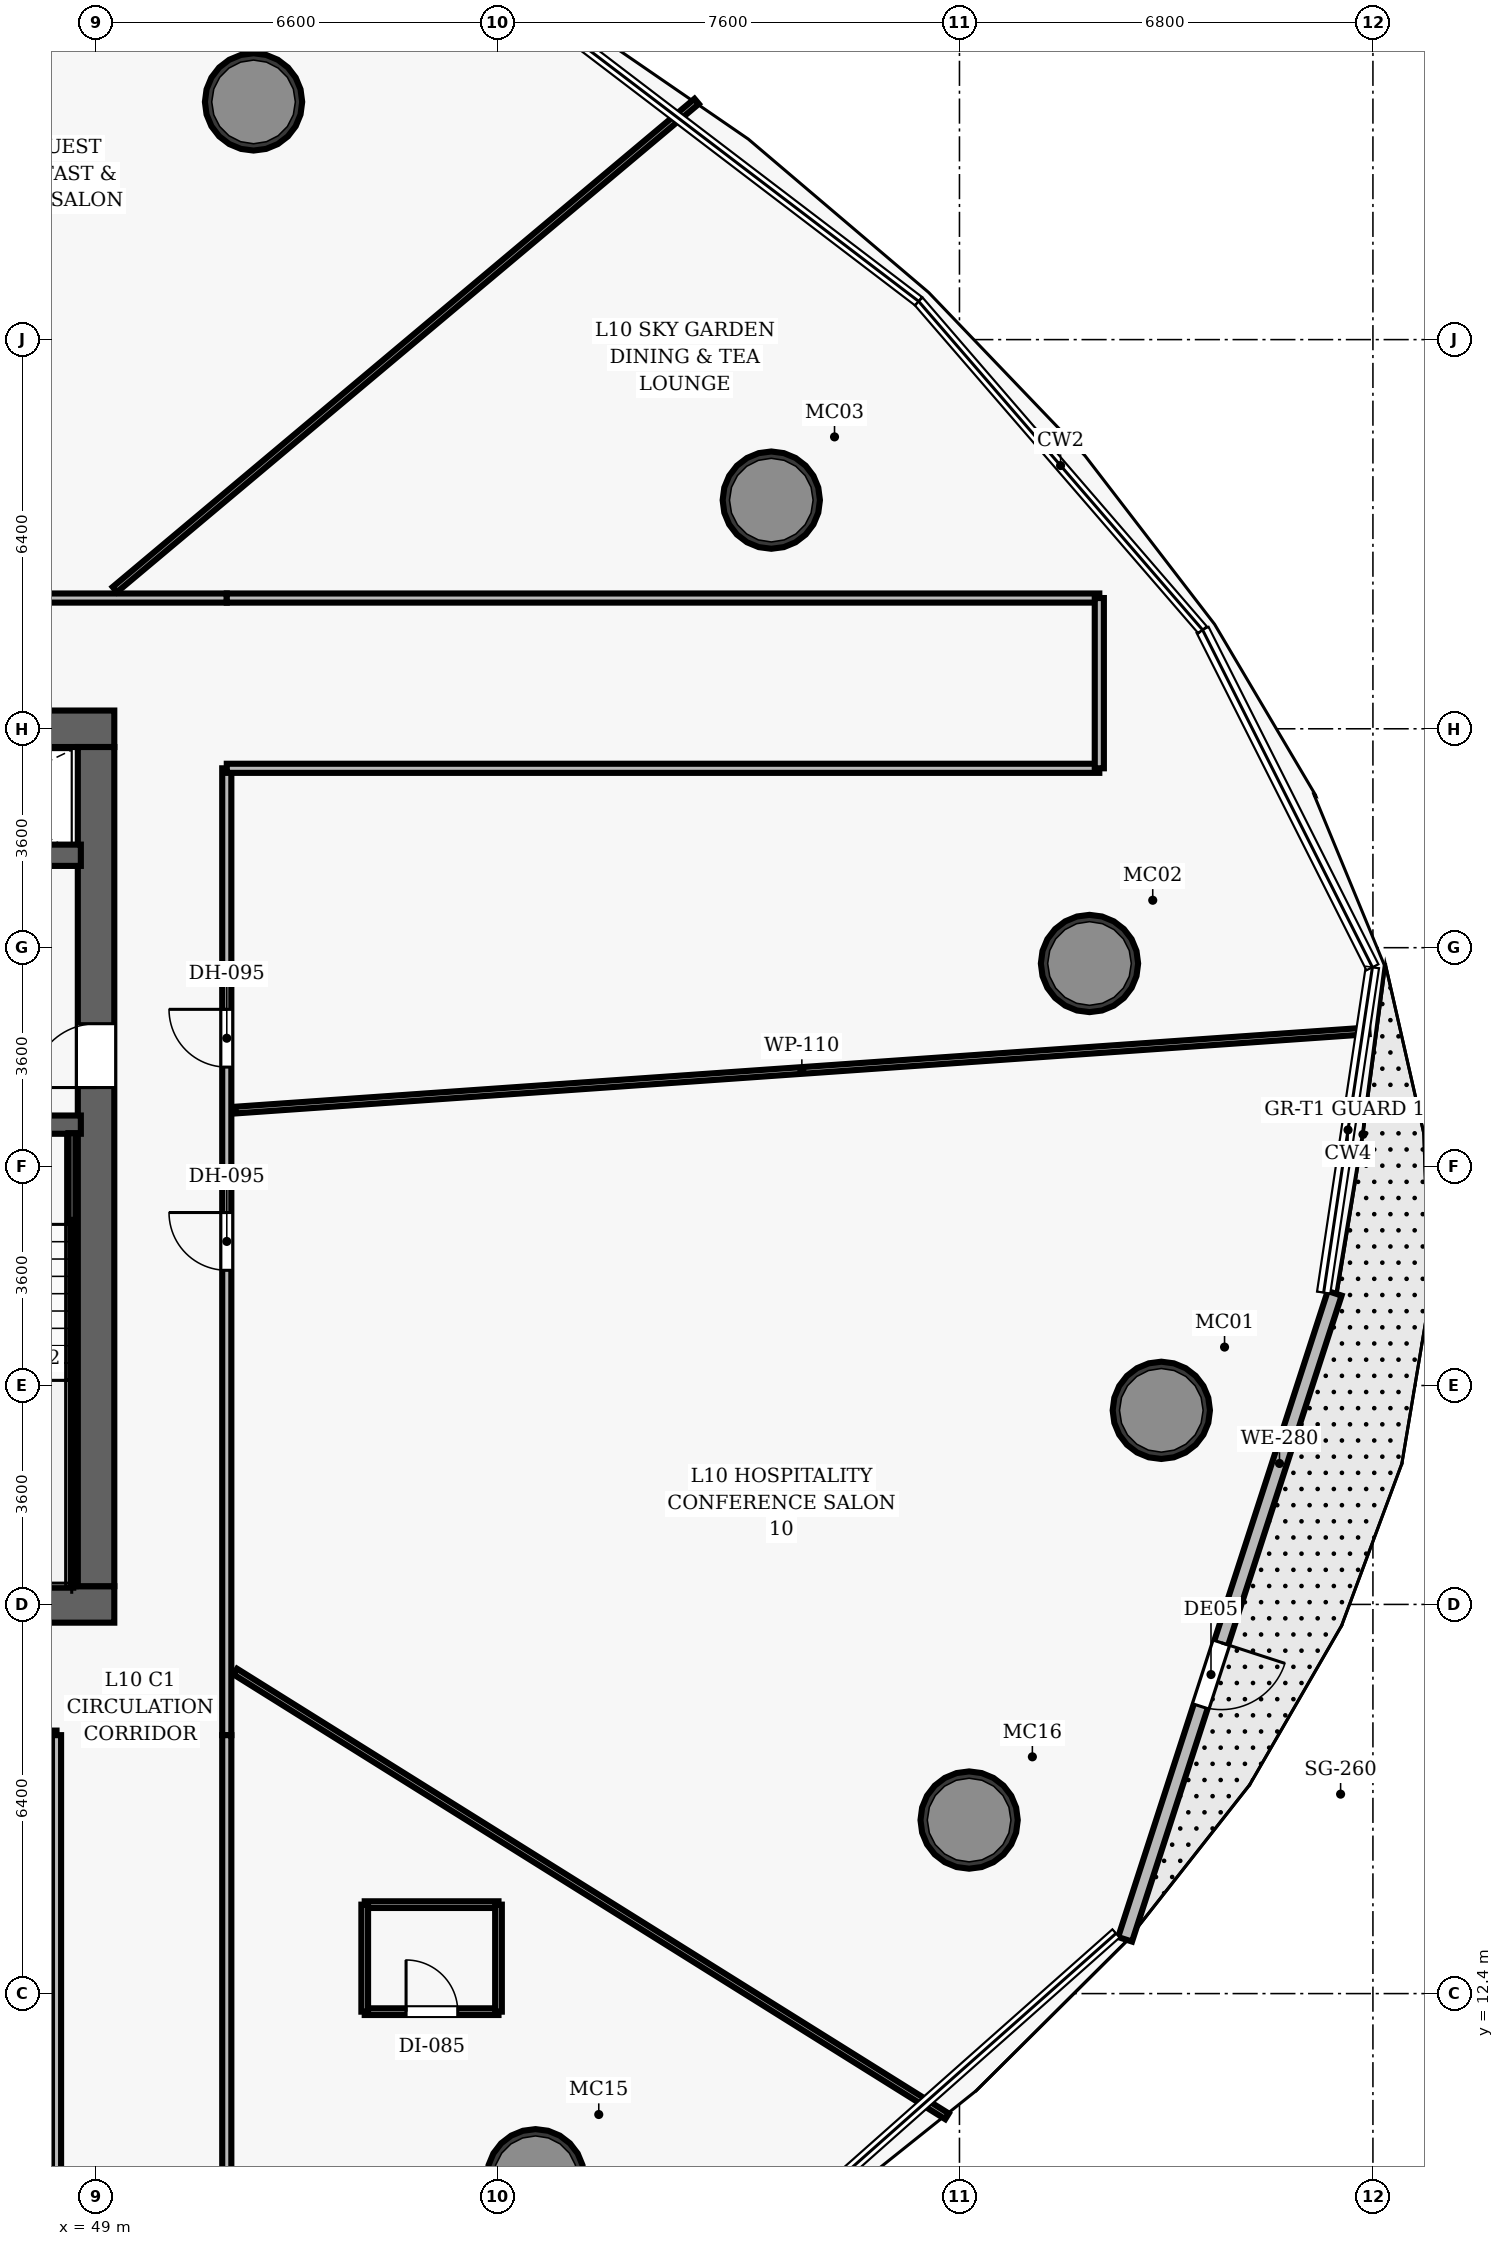
"""IFC4 building model, lengths in metres.
Left out: names, types, materials, properties, quantities, classifications, styles, units other than length and angle.
Written with IfcOpenShell. Run it as: python <this file> out.ifc"""

import sys

from ifc_helpers import new_model, si_unit, direction, frame, frame_2d, origin, origin_2d, place, context, subcontext, project, spatial, rectangle, hollow_circle, extrude, element, fill, save


model = new_model("IFC4")
c1 = context("Model", 3, precision=1e-05, world=origin(), true_north=direction((0.0, 1.0)))
c2 = subcontext(c1, "Body", "Model", "MODEL_VIEW")
j1 = project(units=[si_unit("LENGTHUNIT", "METRE"), si_unit("PLANEANGLEUNIT", "RADIAN")], contexts=[c1])
p1 = place(None, origin())
s1 = spatial("IfcSite", under=j1, at=p1, CompositionType="ELEMENT")
p2 = place(p1, origin())
s2 = spatial("IfcBuilding", under=s1, at=p2, CompositionType="ELEMENT")
p3 = place(p2, frame((0.0, 0.0, 51.9)))
s3 = spatial("IfcBuildingStorey", under=s2, at=p3, CompositionType="ELEMENT", Elevation=51.9)
p4 = place(p3, frame((26.7, 18.8, 0.0), z_axis=(0.0, 0.0, 1.0), x_axis=(1.0, 0.0, 0.0)))
e1 = element("IfcWall", 1, at=p4, inside=s3, PredefinedType="SHEAR", context=c2, shape_type="SweptSolid", body=[
    extrude(rectangle(XDim=22.6, YDim=0.6, at=frame_2d((11.3, 0.0))), origin(), (0.0, 0.0, 1.0), 3.5),
])
p5 = place(p4, frame((14.52, 0.0, 0.0)))
e2 = element("IfcOpeningElement", 2, at=p5, cuts=e1, PredefinedType="OPENING", context=c2, shape_type="SweptSolid", body=[
    extrude(rectangle(XDim=1.05, YDim=2.15, at=frame_2d((0.525, 1.075))), frame((0.0, 0.31, 0.0), z_axis=(0.0, -1.0, 0.0), x_axis=(1.0, 0.0, 0.0)), (0.0, 0.0, 1.0), 0.62),
])
p6 = place(p3, frame((26.7, 33.2, 0.0), z_axis=(0.0, 0.0, 1.0), x_axis=(1.0, 0.0, 0.0)))
e3 = element("IfcWall", 3, at=p6, inside=s3, PredefinedType="SHEAR", context=c2, shape_type="SweptSolid", body=[
    extrude(rectangle(XDim=22.6, YDim=0.6, at=frame_2d((11.3, 0.0))), origin(), (0.0, 0.0, 1.0), 3.5),
])
p7 = place(p6, frame((4.62, 0.0, 0.0)))
e4 = element("IfcOpeningElement", 4, at=p7, cuts=e3, PredefinedType="OPENING", context=c2, shape_type="SweptSolid", body=[
    extrude(rectangle(XDim=1.05, YDim=2.15, at=frame_2d((0.525, 1.075))), frame((0.0, 0.31, 0.0), z_axis=(0.0, -1.0, 0.0), x_axis=(1.0, 0.0, 0.0)), (0.0, 0.0, 1.0), 0.62),
])
p8 = place(p6, frame((14.52, 0.0, 0.0)))
e5 = element("IfcOpeningElement", 5, at=p8, cuts=e3, PredefinedType="OPENING", context=c2, shape_type="SweptSolid", body=[
    extrude(rectangle(XDim=1.05, YDim=2.15, at=frame_2d((0.525, 1.075))), frame((0.0, 0.31, 0.0), z_axis=(0.0, -1.0, 0.0), x_axis=(1.0, 0.0, 0.0)), (0.0, 0.0, 1.0), 0.62),
])
p9 = place(p3, frame((49.0, 19.1, 0.0), z_axis=(0.0, 0.0, 1.0), x_axis=(0.0, 1.0, 0.0)))
e6 = element("IfcWall", 6, at=p9, inside=s3, PredefinedType="SHEAR", context=c2, shape_type="SweptSolid", body=[
    extrude(rectangle(XDim=13.8, YDim=0.6, at=frame_2d((6.9, 0.0))), origin(), (0.0, 0.0, 1.0), 3.5),
])
p10 = place(p9, frame((8.2, 0.0, 0.0)))
e7 = element("IfcOpeningElement", 7, at=p10, cuts=e6, PredefinedType="OPENING", context=c2, shape_type="SweptSolid", body=[
    extrude(rectangle(XDim=1.05, YDim=2.15, at=frame_2d((0.525, 1.075))), frame((0.0, 0.31, 0.0), z_axis=(0.0, -1.0, 0.0), x_axis=(1.0, 0.0, 0.0)), (0.0, 0.0, 1.0), 0.62),
])
for number, where, z_axis, x_axis in (
    (8, (66.52, 21.992, 0.0), (0.0, 0.0, 1.0), (1.0, 0.0, 0.0)),
    (9, (65.339, 29.34, 0.0), (0.0, 0.0, 1.0), (1.0, 0.0, 0.0)),
    (10, (60.105, 36.96, 0.0), (0.0, 0.0, 1.0), (1.0, 0.0, 0.0)),
    (11, (51.59, 43.509, 0.0), (0.0, 0.0, 1.0), (1.0, 0.0, 0.0)),
    (12, (56.228, 9.371, 0.0), (0.0, 0.0, 1.0), (1.0, 0.0, 0.0)),
    (13, (63.359, 15.254, 0.0), (0.0, 0.0, 1.0), (1.0, 0.0, 0.0)),
):
    element("IfcColumn", number, at=place(p3, frame(where, z_axis=z_axis, x_axis=x_axis)), inside=s3, PredefinedType="COLUMN", context=c2, shape_type="SweptSolid", body=[
        extrude(hollow_circle(Radius=0.8, WallThickness=0.06, at=origin_2d()), origin(), (0.0, 0.0, 1.0), 3.5),
    ])
p11 = place(p3, frame((45.08, 26.69, 0.0), z_axis=(0.0, 0.0, 1.0), x_axis=(1.0, 0.0, 0.0)))
e14 = element("IfcWall", 14, at=p11, inside=s3, PredefinedType="SHEAR", context=c2, shape_type="SweptSolid", body=[
    extrude(rectangle(XDim=3.67, YDim=0.3, at=frame_2d((1.835, 0.0))), origin(), (0.0, 0.0, 1.0), 3.5),
])
p12 = place(p11, frame((1.05, 0.0, 0.0)))
e15 = element("IfcOpeningElement", 15, at=p12, cuts=e14, PredefinedType="OPENING", context=c2, shape_type="SweptSolid", body=[
    extrude(rectangle(XDim=1.1, YDim=2.15, at=frame_2d((0.55, 1.075))), frame((0.0, 0.16, 0.0), z_axis=(0.0, -1.0, 0.0), x_axis=(1.0, 0.0, 0.0)), (0.0, 0.0, 1.0), 0.32),
])
p13 = place(p3, frame((48.605, 19.1, 0.0), z_axis=(0.0, 0.0, 1.0), x_axis=(0.0, 1.0, 0.0)))
e16 = element("IfcWall", 16, at=p13, inside=s3, PredefinedType="SHEAR", context=c2, shape_type="SweptSolid", body=[
    extrude(rectangle(XDim=7.45, YDim=0.12, at=frame_2d((3.725, 0.0))), origin(), (0.0, 0.0, 1.0), 3.5),
])
p14 = place(p3, frame((45.51, 19.16, 0.0), z_axis=(0.0, 0.0, 1.0), x_axis=(1.0, 0.0, 0.0)))
e17 = element("IfcWall", 17, at=p14, inside=s3, PredefinedType="SHEAR", context=c2, shape_type="SweptSolid", body=[
    extrude(rectangle(XDim=3.095, YDim=0.12, at=frame_2d((1.547, 0.0))), origin(), (0.0, 0.0, 1.0), 3.5),
])
p15 = place(p3, frame((45.08, 31.12, 0.0), z_axis=(0.0, 0.0, 1.0), x_axis=(1.0, 0.0, 0.0)))
e18 = element("IfcWall", 18, at=p15, inside=s3, PredefinedType="SHEAR", context=c2, shape_type="SweptSolid", body=[
    extrude(rectangle(XDim=3.67, YDim=0.35, at=frame_2d((1.835, 0.0))), origin(), (0.0, 0.0, 1.0), 2.6),
])
p16 = place(p15, frame((1.25, 0.0, 0.0)))
e19 = element("IfcOpeningElement", 19, at=p16, cuts=e18, PredefinedType="OPENING", context=c2, shape_type="SweptSolid", body=[
    extrude(rectangle(XDim=1.1, YDim=2.15, at=frame_2d((0.55, 1.075))), frame((0.0, 0.185, 0.0), z_axis=(0.0, -1.0, 0.0), x_axis=(1.0, 0.0, 0.0)), (0.0, 0.0, 1.0), 0.37),
])
p17 = place(p3, frame((27.65, 35.35, 0.0), z_axis=(0.0, 0.0, 1.0), x_axis=(1.0, 0.0, 0.0)))
e20 = element("IfcWall", 20, at=p17, inside=s3, PredefinedType="PARTITIONING", context=c2, shape_type="SweptSolid", body=[
    extrude(rectangle(XDim=23.5, YDim=0.15, at=frame_2d((11.75, 0.0))), origin(), (0.0, 0.0, 1.0), 2.6),
])
p18 = place(p17, frame((14.334, 0.0, 0.0)))
e21 = element("IfcOpeningElement", 21, at=p18, cuts=e20, PredefinedType="OPENING", context=c2, shape_type="SweptSolid", body=[
    extrude(rectangle(XDim=0.95, YDim=2.15, at=frame_2d((0.475, 1.075))), frame((0.0, 0.085, 0.0), z_axis=(0.0, -1.0, 0.0), x_axis=(1.0, 0.0, 0.0)), (0.0, 0.0, 1.0), 0.17),
])
p19 = place(p17, frame((7.447, 0.0, 0.0)))
e22 = element("IfcOpeningElement", 22, at=p19, cuts=e20, PredefinedType="OPENING", context=c2, shape_type="SweptSolid", body=[
    extrude(rectangle(XDim=0.95, YDim=2.15, at=frame_2d((0.475, 1.075))), frame((0.0, 0.085, 0.0), z_axis=(0.0, -1.0, 0.0), x_axis=(1.0, 0.0, 0.0)), (0.0, 0.0, 1.0), 0.17),
])
p20 = place(p17, frame((4.64, 0.0, 0.0)))
e23 = element("IfcOpeningElement", 23, at=p20, cuts=e20, PredefinedType="OPENING", context=c2, shape_type="SweptSolid", body=[
    extrude(rectangle(XDim=0.95, YDim=2.15, at=frame_2d((0.475, 1.075))), frame((0.0, 0.085, 0.0), z_axis=(0.0, -1.0, 0.0), x_axis=(1.0, 0.0, 0.0)), (0.0, 0.0, 1.0), 0.17),
])
p21 = place(p3, frame((24.85, 16.65, 0.0), z_axis=(0.0, 0.0, 1.0), x_axis=(1.0, 0.0, 0.0)))
e24 = element("IfcWall", 24, at=p21, inside=s3, PredefinedType="PARTITIONING", context=c2, shape_type="SweptSolid", body=[
    extrude(rectangle(XDim=23.5, YDim=0.15, at=frame_2d((11.75, 0.0))), origin(), (0.0, 0.0, 1.0), 2.6),
])
p22 = place(p21, frame((8.216, 0.0, 0.0)))
e25 = element("IfcOpeningElement", 25, at=p22, cuts=e24, PredefinedType="OPENING", context=c2, shape_type="SweptSolid", body=[
    extrude(rectangle(XDim=0.95, YDim=2.15, at=frame_2d((0.475, 1.075))), frame((0.0, 0.085, 0.0), z_axis=(0.0, -1.0, 0.0), x_axis=(1.0, 0.0, 0.0)), (0.0, 0.0, 1.0), 0.17),
])
p23 = place(p21, frame((15.103, 0.0, 0.0)))
e26 = element("IfcOpeningElement", 26, at=p23, cuts=e24, PredefinedType="OPENING", context=c2, shape_type="SweptSolid", body=[
    extrude(rectangle(XDim=0.95, YDim=2.15, at=frame_2d((0.475, 1.075))), frame((0.0, 0.085, 0.0), z_axis=(0.0, -1.0, 0.0), x_axis=(1.0, 0.0, 0.0)), (0.0, 0.0, 1.0), 0.17),
])
p24 = place(p21, frame((17.91, 0.0, 0.0)))
e27 = element("IfcOpeningElement", 27, at=p24, cuts=e24, PredefinedType="OPENING", context=c2, shape_type="SweptSolid", body=[
    extrude(rectangle(XDim=0.95, YDim=2.15, at=frame_2d((0.475, 1.075))), frame((0.0, 0.085, 0.0), z_axis=(0.0, -1.0, 0.0), x_axis=(1.0, 0.0, 0.0)), (0.0, 0.0, 1.0), 0.17),
])
p25 = place(p3, frame((51.15, 16.65, 0.0), z_axis=(0.0, 0.0, 1.0), x_axis=(0.0, 1.0, 0.0)))
e28 = element("IfcWall", 28, at=p25, inside=s3, PredefinedType="PARTITIONING", context=c2, shape_type="SweptSolid", body=[
    extrude(rectangle(XDim=15.9, YDim=0.15, at=frame_2d((7.95, 0.0))), origin(), (0.0, 0.0, 1.0), 2.6),
])
p26 = place(p25, frame((10.986, 0.0, 0.0)))
e29 = element("IfcOpeningElement", 29, at=p26, cuts=e28, PredefinedType="OPENING", context=c2, shape_type="SweptSolid", body=[
    extrude(rectangle(XDim=0.95, YDim=2.15, at=frame_2d((0.475, 1.075))), frame((0.0, 0.085, 0.0), z_axis=(0.0, -1.0, 0.0), x_axis=(1.0, 0.0, 0.0)), (0.0, 0.0, 1.0), 0.17),
])
p27 = place(p25, frame((7.645, 0.0, 0.0)))
e30 = element("IfcOpeningElement", 30, at=p27, cuts=e28, PredefinedType="OPENING", context=c2, shape_type="SweptSolid", body=[
    extrude(rectangle(XDim=0.95, YDim=2.15, at=frame_2d((0.475, 1.075))), frame((0.0, 0.085, 0.0), z_axis=(0.0, -1.0, 0.0), x_axis=(1.0, 0.0, 0.0)), (0.0, 0.0, 1.0), 0.17),
])
for number, where, z_axis, x_axis in (
    (31, (51.15, 35.35, 0.0), (0.0, 0.0, 1.0), (1.0, 0.0, 0.0)),
    (32, (51.15, 32.55, 0.0), (0.0, 0.0, 1.0), (1.0, 0.0, 0.0)),
):
    element("IfcWall", number, at=place(p3, frame(where, z_axis=z_axis, x_axis=x_axis)), inside=s3, PredefinedType="PARTITIONING", context=c2, shape_type="SweptSolid", body=[
        extrude(rectangle(XDim=14.35, YDim=0.15, at=frame_2d((7.175, 0.0))), origin(), (0.0, 0.0, 1.0), 2.6),
    ])
p28 = place(p3, frame((65.5, 32.55, 0.0), z_axis=(0.0, 0.0, 1.0), x_axis=(0.0, 1.0, 0.0)))
e33 = element("IfcWall", 33, at=p28, inside=s3, PredefinedType="PARTITIONING", context=c2, shape_type="SweptSolid", body=[
    extrude(rectangle(XDim=2.8, YDim=0.15, at=frame_2d((1.4, 0.0))), origin(), (0.0, 0.0, 1.0), 2.6),
])
for number, where, z_axis, x_axis in (
    (34, (48.35, 6.5, 0.0), (0.0, 0.0, 1.0), (0.0, 1.0, 0.0)),
    (35, (51.15, 6.5, 0.0), (0.0, 0.0, 1.0), (0.0, 1.0, 0.0)),
):
    element("IfcWall", number, at=place(p3, frame(where, z_axis=z_axis, x_axis=x_axis)), inside=s3, PredefinedType="PARTITIONING", context=c2, shape_type="SweptSolid", body=[
        extrude(rectangle(XDim=10.15, YDim=0.15, at=frame_2d((5.075, 0.0))), origin(), (0.0, 0.0, 1.0), 2.6),
    ])
p29 = place(p3, frame((51.29, 26.929, 0.0), z_axis=(0.0, 0.0, 1.0), x_axis=(0.997563671455, 0.06976189069, 0.0)))
e36 = element("IfcWall", 36, at=p29, inside=s3, PredefinedType="PARTITIONING", context=c2, shape_type="SweptSolid", body=[
    extrude(rectangle(XDim=18.681, YDim=0.11, at=frame_2d((9.34, 0.0))), origin(), (0.0, 0.0, 1.0), 2.6),
])
p30 = place(p3, frame((49.31, 35.49, 0.0), z_axis=(0.0, 0.0, 1.0), x_axis=(0.766037845648, 0.642795472165, 0.0)))
e37 = element("IfcWall", 37, at=p30, inside=s3, PredefinedType="PARTITIONING", context=c2, shape_type="SweptSolid", body=[
    extrude(rectangle(XDim=12.49, YDim=0.11, at=frame_2d((6.245, 0.0))), origin(), (0.0, 0.0, 1.0), 2.6),
])
p31 = place(p3, frame((51.29, 17.696, 0.0), z_axis=(0.0, 0.0, 1.0), x_axis=(0.848048981213, -0.529917847844, 0.0)))
e38 = element("IfcWall", 38, at=p31, inside=s3, PredefinedType="PARTITIONING", context=c2, shape_type="SweptSolid", body=[
    extrude(rectangle(XDim=13.802, YDim=0.11, at=frame_2d((6.901, 0.0))), origin(), (0.0, 0.0, 1.0), 2.6),
])
p32 = place(p3, frame((53.419, 12.103, 0.0), z_axis=(0.0, 0.0, 1.0), x_axis=(1.0, 0.0, 0.0)))
e39 = element("IfcWall", 39, at=p32, inside=s3, PredefinedType="PARTITIONING", context=c2, shape_type="SweptSolid", body=[
    extrude(rectangle(XDim=2.2, YDim=0.11, at=frame_2d((1.1, 0.0))), origin(), (0.0, 0.0, 1.0), 2.6),
])
p33 = place(p32, frame((0.68, 0.0, 0.0)))
e40 = element("IfcOpeningElement", 40, at=p33, cuts=e39, PredefinedType="OPENING", context=c2, shape_type="SweptSolid", body=[
    extrude(rectangle(XDim=0.85, YDim=2.1, at=frame_2d((0.425, 1.05))), frame((0.0, 0.065, 0.0), z_axis=(0.0, -1.0, 0.0), x_axis=(1.0, 0.0, 0.0)), (0.0, 0.0, 1.0), 0.13),
])
p34 = place(p3, frame((53.419, 13.863, 0.0), z_axis=(0.0, 0.0, 1.0), x_axis=(1.0, 0.0, 0.0)))
e41 = element("IfcWall", 41, at=p34, inside=s3, PredefinedType="PARTITIONING", context=c2, shape_type="SweptSolid", body=[
    extrude(rectangle(XDim=2.2, YDim=0.11, at=frame_2d((1.1, 0.0))), origin(), (0.0, 0.0, 1.0), 2.6),
])
for number, where, z_axis, x_axis in (
    (42, (53.419, 12.103, 0.0), (0.0, 0.0, 1.0), (0.0, 1.0, 0.0)),
    (43, (55.619, 12.103, 0.0), (0.0, 0.0, 1.0), (0.0, 1.0, 0.0)),
):
    element("IfcWall", number, at=place(p3, frame(where, z_axis=z_axis, x_axis=x_axis)), inside=s3, PredefinedType="PARTITIONING", context=c2, shape_type="SweptSolid", body=[
        extrude(rectangle(XDim=1.76, YDim=0.11, at=frame_2d((0.88, 0.0))), origin(), (0.0, 0.0, 1.0), 2.6),
    ])
p35 = place(p3, frame((69.371, 23.917, 0.0), z_axis=(0.0, 0.0, 1.0), x_axis=(-0.30855815253, -0.951205480696, 0.0)))
e44 = element("IfcWall", 44, at=p35, inside=s3, PredefinedType="SOLIDWALL", context=c2, shape_type="SweptSolid", body=[
    extrude(rectangle(XDim=11.169, YDim=0.24, at=frame_2d((5.584, 0.0))), origin(), (0.0, 0.0, 1.0), 2.45),
])
p36 = place(p35, frame((6.041, 0.0, 0.0)))
e45 = element("IfcOpeningElement", 45, at=p36, cuts=e44, PredefinedType="OPENING", context=c2, shape_type="SweptSolid", body=[
    extrude(rectangle(XDim=1.1, YDim=2.2, at=frame_2d((0.55, 1.1))), frame((0.0, 0.13, 0.0), z_axis=(0.0, -1.0, 0.0), x_axis=(1.0, 0.0, 0.0)), (0.0, 0.0, 1.0), 0.26),
])
p37 = place(p10, origin())
e46 = element("IfcDoor", 46, at=p37, inside=s3, OperationType="SINGLE_SWING_LEFT", PredefinedType="DOOR", context=c2, shape_type="SweptSolid", body=[
    extrude(rectangle(XDim=1.05, YDim=2.15, at=frame_2d((0.525, 1.075))), frame((0.0, 0.025, 0.0), z_axis=(0.0, -1.0, 0.0), x_axis=(1.0, 0.0, 0.0)), (0.0, 0.0, 1.0), 0.05),
])
fill(e7, e46)
p38 = place(p26, origin())
e47 = element("IfcDoor", 47, at=p38, inside=s3, OperationType="SINGLE_SWING_RIGHT", PredefinedType="DOOR", context=c2, shape_type="SweptSolid", body=[
    extrude(rectangle(XDim=0.95, YDim=2.15, at=frame_2d((0.475, 1.075))), frame((0.0, 0.025, 0.0), z_axis=(0.0, -1.0, 0.0), x_axis=(1.0, 0.0, 0.0)), (0.0, 0.0, 1.0), 0.05),
])
fill(e29, e47)
p39 = place(p33, origin())
e48 = element("IfcDoor", 48, at=p39, inside=s3, OperationType="SINGLE_SWING_LEFT", PredefinedType="DOOR", context=c2, shape_type="SweptSolid", body=[
    extrude(rectangle(XDim=0.85, YDim=2.1, at=frame_2d((0.425, 1.05))), frame((0.0, 0.025, 0.0), z_axis=(0.0, -1.0, 0.0), x_axis=(1.0, 0.0, 0.0)), (0.0, 0.0, 1.0), 0.05),
])
fill(e40, e48)
p40 = place(p27, origin())
e49 = element("IfcDoor", 49, at=p40, inside=s3, OperationType="SINGLE_SWING_RIGHT", PredefinedType="DOOR", context=c2, shape_type="SweptSolid", body=[
    extrude(rectangle(XDim=0.95, YDim=2.15, at=frame_2d((0.475, 1.075))), frame((0.0, 0.025, 0.0), z_axis=(0.0, -1.0, 0.0), x_axis=(1.0, 0.0, 0.0)), (0.0, 0.0, 1.0), 0.05),
])
fill(e30, e49)
p41 = place(p36, origin())
e50 = element("IfcDoor", 50, at=p41, inside=s3, OperationType="SINGLE_SWING_LEFT", PredefinedType="DOOR", context=c2, shape_type="SweptSolid", body=[
    extrude(rectangle(XDim=1.1, YDim=2.2, at=frame_2d((0.55, 1.1))), frame((0.0, 0.025, 0.0), z_axis=(0.0, -1.0, 0.0), x_axis=(1.0, 0.0, 0.0)), (0.0, 0.0, 1.0), 0.05),
])
fill(e45, e50)
save(model, sys.argv[1])
